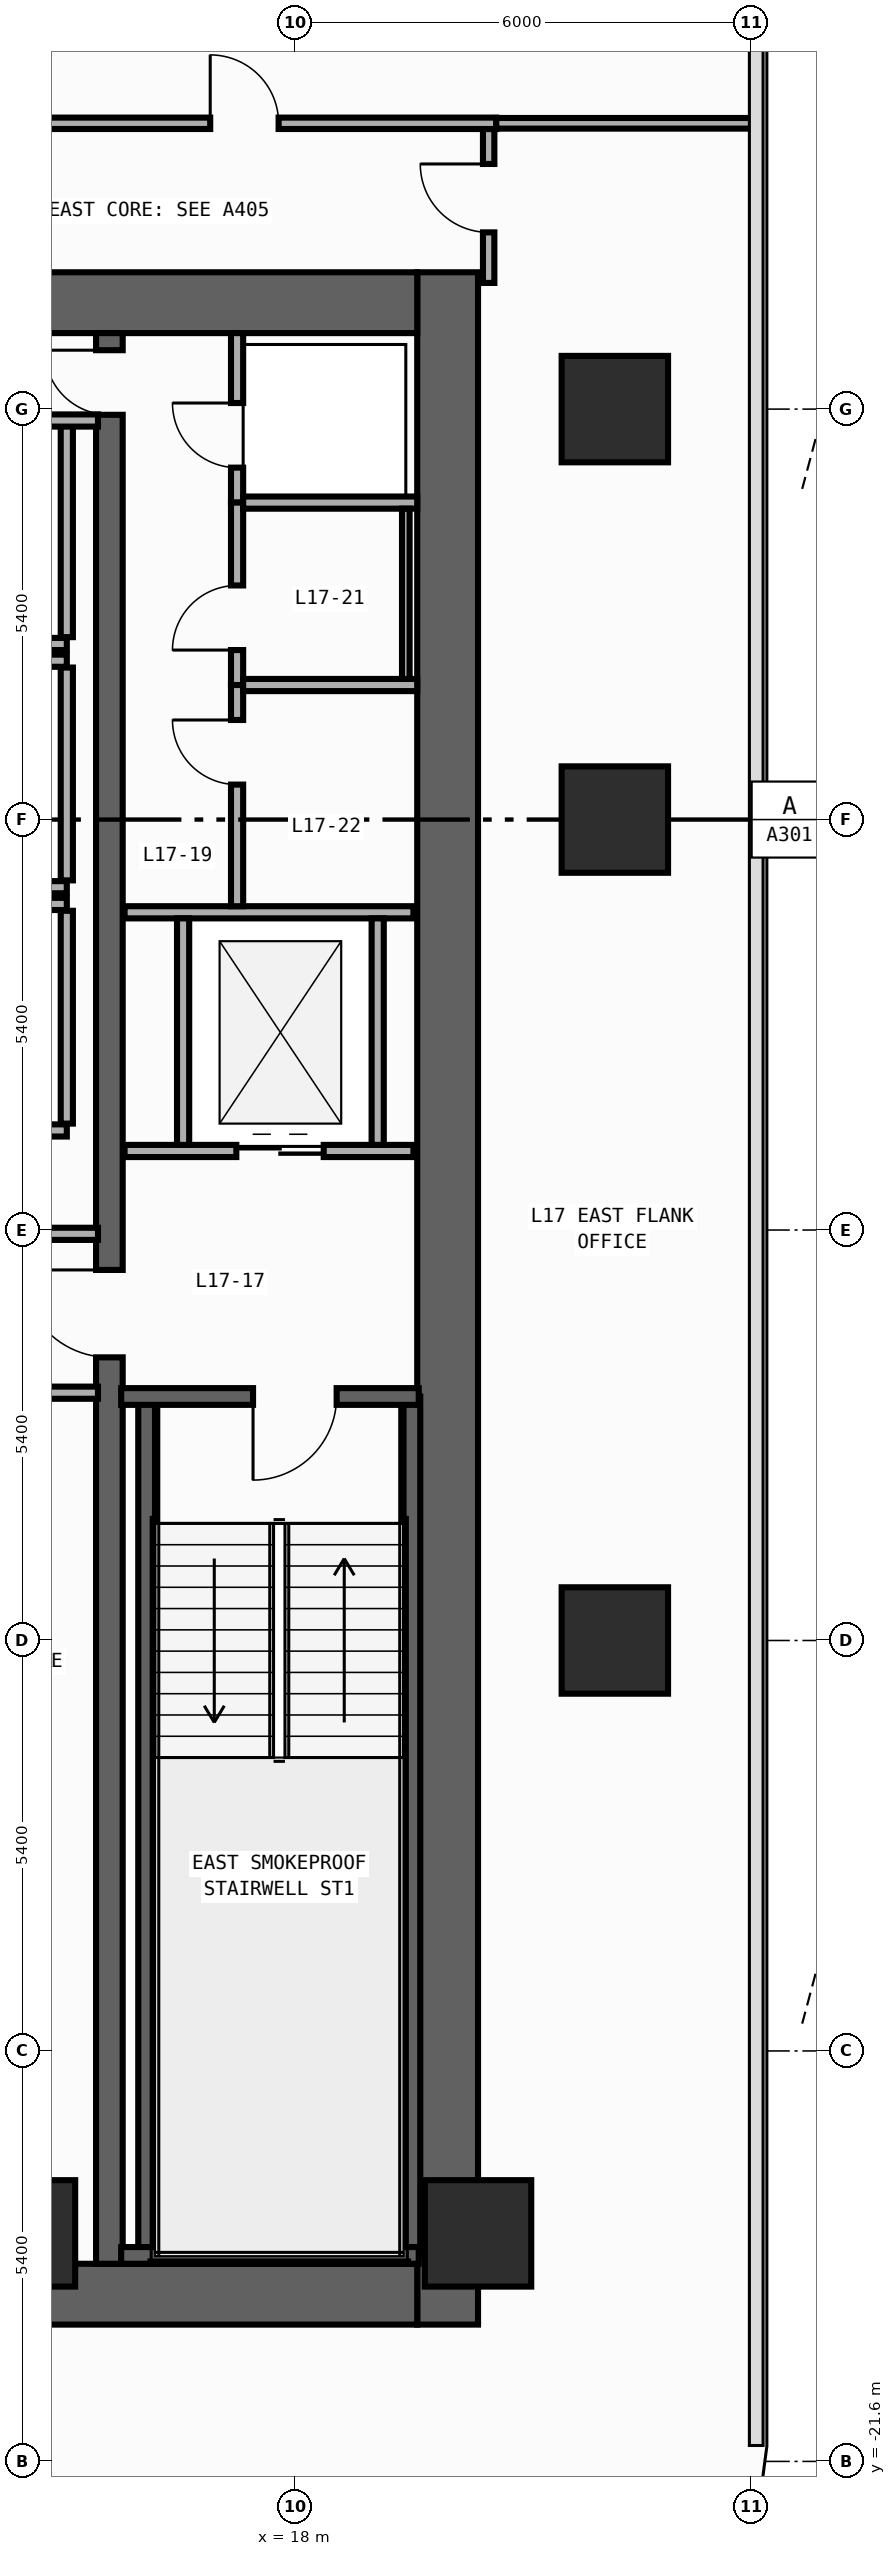
"""IFC4 building model, lengths in metres.
Left out: names, types, materials, properties, quantities, classifications, styles, units other than length and angle.
Written with IfcOpenShell. Run it as: python <this file> out.ifc"""

import sys

from ifc_helpers import new_model, si_unit, direction, frame, frame_2d, origin, origin_2d, place, context, subcontext, project, spatial, rectangle, extrude, element, fill, save


model = new_model("IFC4")
c1 = context("Model", 3, precision=1e-05, world=origin(), true_north=direction((0.0, 1.0)))
c2 = subcontext(c1, "Body", "Model", "MODEL_VIEW")
j1 = project(units=[si_unit("LENGTHUNIT", "METRE"), si_unit("PLANEANGLEUNIT", "RADIAN")], contexts=[c1])
p1 = place(None, origin())
s1 = spatial("IfcSite", under=j1, at=p1, CompositionType="ELEMENT")
p2 = place(p1, origin())
s2 = spatial("IfcBuilding", under=s1, at=p2, CompositionType="ELEMENT")
p3 = place(p2, frame((0.0, 0.0, 72.2)))
s3 = spatial("IfcBuildingStorey", under=s2, at=p3, CompositionType="ELEMENT", Elevation=72.2)
p4 = place(p3, frame((20.0, -19.8, 0.0), z_axis=(0.0, 0.0, 1.0), x_axis=(0.0, 1.0, 0.0)))
e1 = element("IfcWall", 1, at=p4, inside=s3, PredefinedType="SHEAR", context=c2, shape_type="SweptSolid", body=[
    extrude(rectangle(XDim=27.0, YDim=0.8, at=frame_2d((13.5, 0.0))), origin(), (0.0, 0.0, 1.0), 3.94),
])
for number, where, z_axis, x_axis in (
    (2, (12.8, -19.4, 0.0), (0.0, 0.0, 1.0), (1.0, 0.0, 0.0)),
    (3, (12.8, 6.8, 0.0), (0.0, 0.0, 1.0), (1.0, 0.0, 0.0)),
):
    element("IfcWall", number, at=place(p3, frame(where, z_axis=z_axis, x_axis=x_axis)), inside=s3, PredefinedType="SHEAR", context=c2, shape_type="SweptSolid", body=[
        extrude(rectangle(XDim=6.8, YDim=0.8, at=frame_2d((3.4, 0.0))), origin(), (0.0, 0.0, 1.0), 3.94),
    ])
p5 = place(p3, frame((15.55, -19.0, 0.0), z_axis=(0.0, 0.0, 1.0), x_axis=(0.0, 1.0, 0.0)))
e4 = element("IfcWall", 4, at=p5, inside=s3, PredefinedType="SHEAR", context=c2, shape_type="SweptSolid", body=[
    extrude(rectangle(XDim=25.4, YDim=0.35, at=frame_2d((12.7, 0.0))), origin(), (0.0, 0.0, 1.0), 3.94),
])
p6 = place(p5, frame((11.925, 0.0, 0.0)))
e5 = element("IfcOpeningElement", 5, at=p6, cuts=e4, PredefinedType="OPENING", context=c2, shape_type="SweptSolid", body=[
    extrude(rectangle(XDim=1.15, YDim=2.2, at=frame_2d((0.575, 1.1))), frame((0.0, 0.185, 0.0), z_axis=(0.0, -1.0, 0.0), x_axis=(1.0, 0.0, 0.0)), (0.0, 0.0, 1.0), 0.37),
])
p7 = place(p5, frame((24.325, 0.0, 0.0)))
e6 = element("IfcOpeningElement", 6, at=p7, cuts=e4, PredefinedType="OPENING", context=c2, shape_type="SweptSolid", body=[
    extrude(rectangle(XDim=0.85, YDim=2.1, at=frame_2d((0.425, 1.05))), frame((0.0, 0.185, 0.0), z_axis=(0.0, -1.0, 0.0), x_axis=(1.0, 0.0, 0.0)), (0.0, 0.0, 1.0), 0.37),
])
for number, where, z_axis, x_axis in (
    (7, (16.04, -18.89, 0.0), (0.0, 0.0, 1.0), (0.0, 1.0, 0.0)),
    (8, (19.53, -18.89, 0.0), (0.0, 0.0, 1.0), (0.0, 1.0, 0.0)),
):
    element("IfcWall", number, at=place(p3, frame(where, z_axis=z_axis, x_axis=x_axis)), inside=s3, PredefinedType="SHEAR", context=c2, shape_type="SweptSolid", body=[
        extrude(rectangle(XDim=11.3, YDim=0.22, at=frame_2d((5.65, 0.0))), origin(), (0.0, 0.0, 1.0), 3.94),
    ])
p8 = place(p3, frame((15.705, -18.89, 0.0), z_axis=(0.0, 0.0, 1.0), x_axis=(1.0, 0.0, 0.0)))
e9 = element("IfcWall", 9, at=p8, inside=s3, PredefinedType="SHEAR", context=c2, shape_type="SweptSolid", body=[
    extrude(rectangle(XDim=3.915, YDim=0.22, at=frame_2d((1.958, 0.0))), origin(), (0.0, 0.0, 1.0), 3.94),
])
p9 = place(p3, frame((19.62, -7.59, 0.0), z_axis=(0.0, 0.0, 1.0), x_axis=(-1.0, 0.0, 0.0)))
e10 = element("IfcWall", 10, at=p9, inside=s3, PredefinedType="SHEAR", context=c2, shape_type="SweptSolid", body=[
    extrude(rectangle(XDim=3.915, YDim=0.22, at=frame_2d((1.958, 0.0))), origin(), (0.0, 0.0, 1.0), 3.94),
])
p10 = place(p9, frame((1.08, 0.0, 0.0)))
e11 = element("IfcOpeningElement", 11, at=p10, cuts=e10, PredefinedType="OPENING", context=c2, shape_type="SweptSolid", body=[
    extrude(rectangle(XDim=1.1, YDim=2.2, at=frame_2d((0.55, 1.1))), frame((0.0, 0.12, 0.0), z_axis=(0.0, -1.0, 0.0), x_axis=(1.0, 0.0, 0.0)), (0.0, 0.0, 1.0), 0.24),
])
for number, where, z_axis, x_axis in (
    (12, (20.4, -18.6, 0.0), (0.0, 0.0, 1.0), (1.0, 0.0, 0.0)),
    (13, (14.4, -18.6, 0.0), (0.0, 0.0, 1.0), (1.0, 0.0, 0.0)),
    (14, (22.2, -10.8, 0.0), (0.0, 0.0, 1.0), (1.0, 0.0, 0.0)),
    (15, (22.2, 0.0, 0.0), (0.0, 0.0, 1.0), (1.0, 0.0, 0.0)),
    (16, (22.2, 5.4, 0.0), (0.0, 0.0, 1.0), (1.0, 0.0, 0.0)),
):
    element("IfcColumn", number, at=place(p3, frame(where, z_axis=z_axis, x_axis=x_axis)), inside=s3, PredefinedType="COLUMN", context=c2, shape_type="SweptSolid", body=[
        extrude(rectangle(XDim=1.4, YDim=1.4, at=origin_2d()), origin(), (0.0, 0.0, 1.0), 4.2),
    ])
p11 = place(p3, frame((12.8, 2.31, 0.0), z_axis=(0.0, 0.0, 1.0), x_axis=(1.0, 0.0, 0.0)))
e17 = element("IfcWall", 17, at=p11, inside=s3, PredefinedType="STANDARD", context=c2, shape_type="SweptSolid", body=[
    extrude(rectangle(XDim=2.19, YDim=0.16, at=frame_2d((1.095, 0.0))), origin(), (0.0, 0.0, 1.0), 3.94),
])
p12 = place(p3, frame((14.99, 2.4, 0.0), z_axis=(0.0, 0.0, 1.0), x_axis=(0.0, 1.0, 0.0)))
e18 = element("IfcWall", 18, at=p12, inside=s3, PredefinedType="STANDARD", context=c2, shape_type="SweptSolid", body=[
    extrude(rectangle(XDim=2.8, YDim=0.16, at=frame_2d((1.4, 0.0))), origin(), (0.0, 0.0, 1.0), 3.94),
])
for number, where, z_axis, x_axis in (
    (19, (12.8, -0.89, 0.0), (0.0, 0.0, 1.0), (1.0, 0.0, 0.0)),
    (20, (12.8, 2.09, 0.0), (0.0, 0.0, 1.0), (1.0, 0.0, 0.0)),
):
    element("IfcWall", number, at=place(p3, frame(where, z_axis=z_axis, x_axis=x_axis)), inside=s3, PredefinedType="STANDARD", context=c2, shape_type="SweptSolid", body=[
        extrude(rectangle(XDim=2.19, YDim=0.16, at=frame_2d((1.095, 0.0))), origin(), (0.0, 0.0, 1.0), 3.94),
    ])
p13 = place(p3, frame((14.99, -0.8, 0.0), z_axis=(0.0, 0.0, 1.0), x_axis=(0.0, 1.0, 0.0)))
e21 = element("IfcWall", 21, at=p13, inside=s3, PredefinedType="STANDARD", context=c2, shape_type="SweptSolid", body=[
    extrude(rectangle(XDim=2.8, YDim=0.16, at=frame_2d((1.4, 0.0))), origin(), (0.0, 0.0, 1.0), 3.94),
])
for number, where, z_axis, x_axis in (
    (22, (12.8, -4.09, 0.0), (0.0, 0.0, 1.0), (1.0, 0.0, 0.0)),
    (23, (12.8, -1.11, 0.0), (0.0, 0.0, 1.0), (1.0, 0.0, 0.0)),
):
    element("IfcWall", number, at=place(p3, frame(where, z_axis=z_axis, x_axis=x_axis)), inside=s3, PredefinedType="STANDARD", context=c2, shape_type="SweptSolid", body=[
        extrude(rectangle(XDim=2.19, YDim=0.16, at=frame_2d((1.095, 0.0))), origin(), (0.0, 0.0, 1.0), 3.94),
    ])
p14 = place(p3, frame((14.99, -4.0, 0.0), z_axis=(0.0, 0.0, 1.0), x_axis=(0.0, 1.0, 0.0)))
e24 = element("IfcWall", 24, at=p14, inside=s3, PredefinedType="STANDARD", context=c2, shape_type="SweptSolid", body=[
    extrude(rectangle(XDim=2.8, YDim=0.16, at=frame_2d((1.4, 0.0))), origin(), (0.0, 0.0, 1.0), 3.94),
])
p15 = place(p3, frame((15.75, -4.36, 0.0), z_axis=(0.0, 0.0, 1.0), x_axis=(1.0, 0.0, 0.0)))
e25 = element("IfcWall", 25, at=p15, inside=s3, PredefinedType="STANDARD", context=c2, shape_type="SweptSolid", body=[
    extrude(rectangle(XDim=3.8, YDim=0.16, at=frame_2d((1.9, 0.0))), origin(), (0.0, 0.0, 1.0), 3.94),
])
p16 = place(p15, frame((1.47, 0.0, 0.0)))
e26 = element("IfcOpeningElement", 26, at=p16, cuts=e25, PredefinedType="OPENING", context=c2, shape_type="SweptSolid", body=[
    extrude(rectangle(XDim=1.15, YDim=2.2, at=frame_2d((0.575, 1.1))), frame((0.0, 0.09, 0.0), z_axis=(0.0, -1.0, 0.0), x_axis=(1.0, 0.0, 0.0)), (0.0, 0.0, 1.0), 0.18),
])
p17 = place(p3, frame((15.75, -1.22, 0.0), z_axis=(0.0, 0.0, 1.0), x_axis=(1.0, 0.0, 0.0)))
e27 = element("IfcWall", 27, at=p17, inside=s3, PredefinedType="STANDARD", context=c2, shape_type="SweptSolid", body=[
    extrude(rectangle(XDim=3.8, YDim=0.16, at=frame_2d((1.9, 0.0))), origin(), (0.0, 0.0, 1.0), 3.94),
])
for number, where, z_axis, x_axis in (
    (28, (16.52, -4.28, 0.0), (0.0, 0.0, 1.0), (0.0, 1.0, 0.0)),
    (29, (19.08, -4.28, 0.0), (0.0, 0.0, 1.0), (0.0, 1.0, 0.0)),
):
    element("IfcWall", number, at=place(p3, frame(where, z_axis=z_axis, x_axis=x_axis)), inside=s3, PredefinedType="STANDARD", context=c2, shape_type="SweptSolid", body=[
        extrude(rectangle(XDim=2.98, YDim=0.16, at=frame_2d((1.49, 0.0))), origin(), (0.0, 0.0, 1.0), 3.94),
    ])
for number, where, z_axis, x_axis in (
    (30, (12.8, -5.45, 0.0), (0.0, 0.0, 1.0), (1.0, 0.0, 0.0)),
    (31, (12.8, -7.54, 0.0), (0.0, 0.0, 1.0), (1.0, 0.0, 0.0)),
    (32, (12.8, 5.25, 0.0), (0.0, 0.0, 1.0), (1.0, 0.0, 0.0)),
):
    element("IfcWall", number, at=place(p3, frame(where, z_axis=z_axis, x_axis=x_axis)), inside=s3, PredefinedType="STANDARD", context=c2, shape_type="SweptSolid", body=[
        extrude(rectangle(XDim=2.6, YDim=0.16, at=frame_2d((1.3, 0.0))), origin(), (0.0, 0.0, 1.0), 3.94),
    ])
p18 = place(p3, frame((17.23, 4.17, 0.0), z_axis=(0.0, 0.0, 1.0), x_axis=(0.0, 1.0, 0.0)))
e33 = element("IfcWall", 33, at=p18, inside=s3, PredefinedType="PARTITIONING", context=c2, shape_type="SweptSolid", body=[
    extrude(rectangle(XDim=2.23, YDim=0.16, at=frame_2d((1.115, 0.0))), origin(), (0.0, 0.0, 1.0), 3.94),
])
p19 = place(p18, frame((0.46, 0.0, 0.0)))
e34 = element("IfcOpeningElement", 34, at=p19, cuts=e33, PredefinedType="OPENING", context=c2, shape_type="SweptSolid", body=[
    extrude(rectangle(XDim=0.85, YDim=2.1, at=frame_2d((0.425, 1.05))), frame((0.0, 0.09, 0.0), z_axis=(0.0, -1.0, 0.0), x_axis=(1.0, 0.0, 0.0)), (0.0, 0.0, 1.0), 0.18),
])
p20 = place(p3, frame((17.23, 1.77, 0.0), z_axis=(0.0, 0.0, 1.0), x_axis=(0.0, 1.0, 0.0)))
e35 = element("IfcWall", 35, at=p20, inside=s3, PredefinedType="PARTITIONING", context=c2, shape_type="SweptSolid", body=[
    extrude(rectangle(XDim=2.4, YDim=0.16, at=frame_2d((1.2, 0.0))), origin(), (0.0, 0.0, 1.0), 3.94),
])
p21 = place(p20, frame((0.46, 0.0, 0.0)))
e36 = element("IfcOpeningElement", 36, at=p21, cuts=e35, PredefinedType="OPENING", context=c2, shape_type="SweptSolid", body=[
    extrude(rectangle(XDim=0.85, YDim=2.1, at=frame_2d((0.425, 1.05))), frame((0.0, 0.09, 0.0), z_axis=(0.0, -1.0, 0.0), x_axis=(1.0, 0.0, 0.0)), (0.0, 0.0, 1.0), 0.18),
])
p22 = place(p3, frame((17.23, -1.14, 0.0), z_axis=(0.0, 0.0, 1.0), x_axis=(0.0, 1.0, 0.0)))
e37 = element("IfcWall", 37, at=p22, inside=s3, PredefinedType="PARTITIONING", context=c2, shape_type="SweptSolid", body=[
    extrude(rectangle(XDim=2.91, YDim=0.16, at=frame_2d((1.455, 0.0))), origin(), (0.0, 0.0, 1.0), 3.94),
])
p23 = place(p22, frame((1.6, 0.0, 0.0)))
e38 = element("IfcOpeningElement", 38, at=p23, cuts=e37, PredefinedType="OPENING", context=c2, shape_type="SweptSolid", body=[
    extrude(rectangle(XDim=0.85, YDim=2.1, at=frame_2d((0.425, 1.05))), frame((0.0, 0.09, 0.0), z_axis=(0.0, -1.0, 0.0), x_axis=(1.0, 0.0, 0.0)), (0.0, 0.0, 1.0), 0.18),
])
for number, where, z_axis, x_axis in (
    (39, (17.31, 4.17, 0.0), (0.0, 0.0, 1.0), (1.0, 0.0, 0.0)),
    (40, (17.31, 1.77, 0.0), (0.0, 0.0, 1.0), (1.0, 0.0, 0.0)),
):
    element("IfcWall", number, at=place(p3, frame(where, z_axis=z_axis, x_axis=x_axis)), inside=s3, PredefinedType="PARTITIONING", context=c2, shape_type="SweptSolid", body=[
        extrude(rectangle(XDim=2.29, YDim=0.16, at=frame_2d((1.145, 0.0))), origin(), (0.0, 0.0, 1.0), 3.94),
    ])
p24 = place(p3, frame((20.54, 7.06, 0.0), z_axis=(0.0, 0.0, 1.0), x_axis=(0.0, 1.0, 0.0)))
e41 = element("IfcWall", 41, at=p24, inside=s3, PredefinedType="PARTITIONING", context=c2, shape_type="SweptSolid", body=[
    extrude(rectangle(XDim=2.025, YDim=0.15, at=frame_2d((1.012, 0.0))), origin(), (0.0, 0.0, 1.0), 3.94),
])
p25 = place(p24, frame((0.665, 0.0, 0.0)))
e42 = element("IfcOpeningElement", 42, at=p25, cuts=e41, PredefinedType="OPENING", context=c2, shape_type="SweptSolid", body=[
    extrude(rectangle(XDim=0.9, YDim=2.15, at=frame_2d((0.45, 1.075))), frame((0.0, 0.085, 0.0), z_axis=(0.0, -1.0, 0.0), x_axis=(1.0, 0.0, 0.0)), (0.0, 0.0, 1.0), 0.17),
])
p26 = place(p3, frame((11.81, 9.16, 0.0), z_axis=(0.0, 0.0, 1.0), x_axis=(1.0, 0.0, 0.0)))
e43 = element("IfcWall", 43, at=p26, inside=s3, PredefinedType="PARTITIONING", context=c2, shape_type="SweptSolid", body=[
    extrude(rectangle(XDim=8.83, YDim=0.15, at=frame_2d((4.415, 0.0))), origin(), (0.0, 0.0, 1.0), 3.94),
])
p27 = place(p26, frame((5.067, 0.0, 0.0)))
e44 = element("IfcOpeningElement", 44, at=p27, cuts=e43, PredefinedType="OPENING", context=c2, shape_type="SweptSolid", body=[
    extrude(rectangle(XDim=0.9, YDim=2.15, at=frame_2d((0.45, 1.075))), frame((0.0, 0.085, 0.0), z_axis=(0.0, -1.0, 0.0), x_axis=(1.0, 0.0, 0.0)), (0.0, 0.0, 1.0), 0.17),
])
p28 = place(p3, frame((20.64, 9.16, 0.0), z_axis=(0.0, 0.0, 1.0), x_axis=(1.0, 0.0, 0.0)))
e45 = element("IfcWall", 45, at=p28, inside=s3, PredefinedType="PARTITIONING", context=c2, shape_type="SweptSolid", body=[
    extrude(rectangle(XDim=3.415, YDim=0.14, at=frame_2d((1.708, 0.0))), origin(), (0.0, 0.0, 1.0), 3.94),
])
p29 = place(p3, frame((19.45, 4.09, 0.0), z_axis=(0.0, 0.0, 1.0), x_axis=(0.0, -1.0, 0.0)))
e46 = element("IfcWall", 46, at=p29, inside=s3, PredefinedType="PARTITIONING", context=c2, shape_type="SweptSolid", body=[
    extrude(rectangle(XDim=2.24, YDim=0.1, at=frame_2d((1.12, 0.0))), origin(), (0.0, 0.0, 1.0), 3.94),
])
p30 = place(p10, origin())
e47 = element("IfcDoor", 47, at=p30, inside=s3, OperationType="SINGLE_SWING_RIGHT", PredefinedType="DOOR", context=c2, shape_type="SweptSolid", body=[
    extrude(rectangle(XDim=1.1, YDim=2.2, at=frame_2d((0.55, 1.1))), frame((0.0, 0.025, 0.0), z_axis=(0.0, -1.0, 0.0), x_axis=(1.0, 0.0, 0.0)), (0.0, 0.0, 1.0), 0.05),
])
fill(e11, e47)
p31 = place(p6, origin())
e48 = element("IfcDoor", 48, at=p31, inside=s3, OperationType="SINGLE_SWING_RIGHT", PredefinedType="DOOR", context=c2, shape_type="SweptSolid", body=[
    extrude(rectangle(XDim=1.15, YDim=2.2, at=frame_2d((0.575, 1.1))), frame((0.0, 0.025, 0.0), z_axis=(0.0, -1.0, 0.0), x_axis=(1.0, 0.0, 0.0)), (0.0, 0.0, 1.0), 0.05),
])
fill(e5, e48)
p32 = place(p7, origin())
e49 = element("IfcDoor", 49, at=p32, inside=s3, OperationType="SINGLE_SWING_RIGHT", PredefinedType="DOOR", context=c2, shape_type="SweptSolid", body=[
    extrude(rectangle(XDim=0.85, YDim=2.1, at=frame_2d((0.425, 1.05))), frame((0.0, 0.025, 0.0), z_axis=(0.0, -1.0, 0.0), x_axis=(1.0, 0.0, 0.0)), (0.0, 0.0, 1.0), 0.05),
])
fill(e6, e49)
p33 = place(p16, origin())
e50 = element("IfcDoor", 50, at=p33, inside=s3, OperationType="DOUBLE_DOOR_SLIDING", PredefinedType="DOOR", context=c2, shape_type="SweptSolid", body=[
    extrude(rectangle(XDim=1.15, YDim=2.2, at=frame_2d((0.575, 1.1))), frame((0.0, 0.025, 0.0), z_axis=(0.0, -1.0, 0.0), x_axis=(1.0, 0.0, 0.0)), (0.0, 0.0, 1.0), 0.05),
])
fill(e26, e50)
p34 = place(p19, origin())
e51 = element("IfcDoor", 51, at=p34, inside=s3, OperationType="SINGLE_SWING_RIGHT", PredefinedType="DOOR", context=c2, shape_type="SweptSolid", body=[
    extrude(rectangle(XDim=0.85, YDim=2.1, at=frame_2d((0.425, 1.05))), frame((0.0, 0.025, 0.0), z_axis=(0.0, -1.0, 0.0), x_axis=(1.0, 0.0, 0.0)), (0.0, 0.0, 1.0), 0.05),
])
fill(e34, e51)
p35 = place(p21, origin())
e52 = element("IfcDoor", 52, at=p35, inside=s3, OperationType="SINGLE_SWING_LEFT", PredefinedType="DOOR", context=c2, shape_type="SweptSolid", body=[
    extrude(rectangle(XDim=0.85, YDim=2.1, at=frame_2d((0.425, 1.05))), frame((0.0, 0.025, 0.0), z_axis=(0.0, -1.0, 0.0), x_axis=(1.0, 0.0, 0.0)), (0.0, 0.0, 1.0), 0.05),
])
fill(e36, e52)
p36 = place(p23, origin())
e53 = element("IfcDoor", 53, at=p36, inside=s3, OperationType="SINGLE_SWING_RIGHT", PredefinedType="DOOR", context=c2, shape_type="SweptSolid", body=[
    extrude(rectangle(XDim=0.85, YDim=2.1, at=frame_2d((0.425, 1.05))), frame((0.0, 0.025, 0.0), z_axis=(0.0, -1.0, 0.0), x_axis=(1.0, 0.0, 0.0)), (0.0, 0.0, 1.0), 0.05),
])
fill(e38, e53)
p37 = place(p25, origin())
e54 = element("IfcDoor", 54, at=p37, inside=s3, OperationType="SINGLE_SWING_RIGHT", PredefinedType="DOOR", context=c2, shape_type="SweptSolid", body=[
    extrude(rectangle(XDim=0.9, YDim=2.15, at=frame_2d((0.45, 1.075))), frame((0.0, 0.025, 0.0), z_axis=(0.0, -1.0, 0.0), x_axis=(1.0, 0.0, 0.0)), (0.0, 0.0, 1.0), 0.05),
])
fill(e42, e54)
p38 = place(p27, origin())
e55 = element("IfcDoor", 55, at=p38, inside=s3, OperationType="SINGLE_SWING_LEFT", PredefinedType="DOOR", context=c2, shape_type="SweptSolid", body=[
    extrude(rectangle(XDim=0.9, YDim=2.15, at=frame_2d((0.45, 1.075))), frame((0.0, 0.025, 0.0), z_axis=(0.0, -1.0, 0.0), x_axis=(1.0, 0.0, 0.0)), (0.0, 0.0, 1.0), 0.05),
])
fill(e44, e55)
save(model, sys.argv[1])
